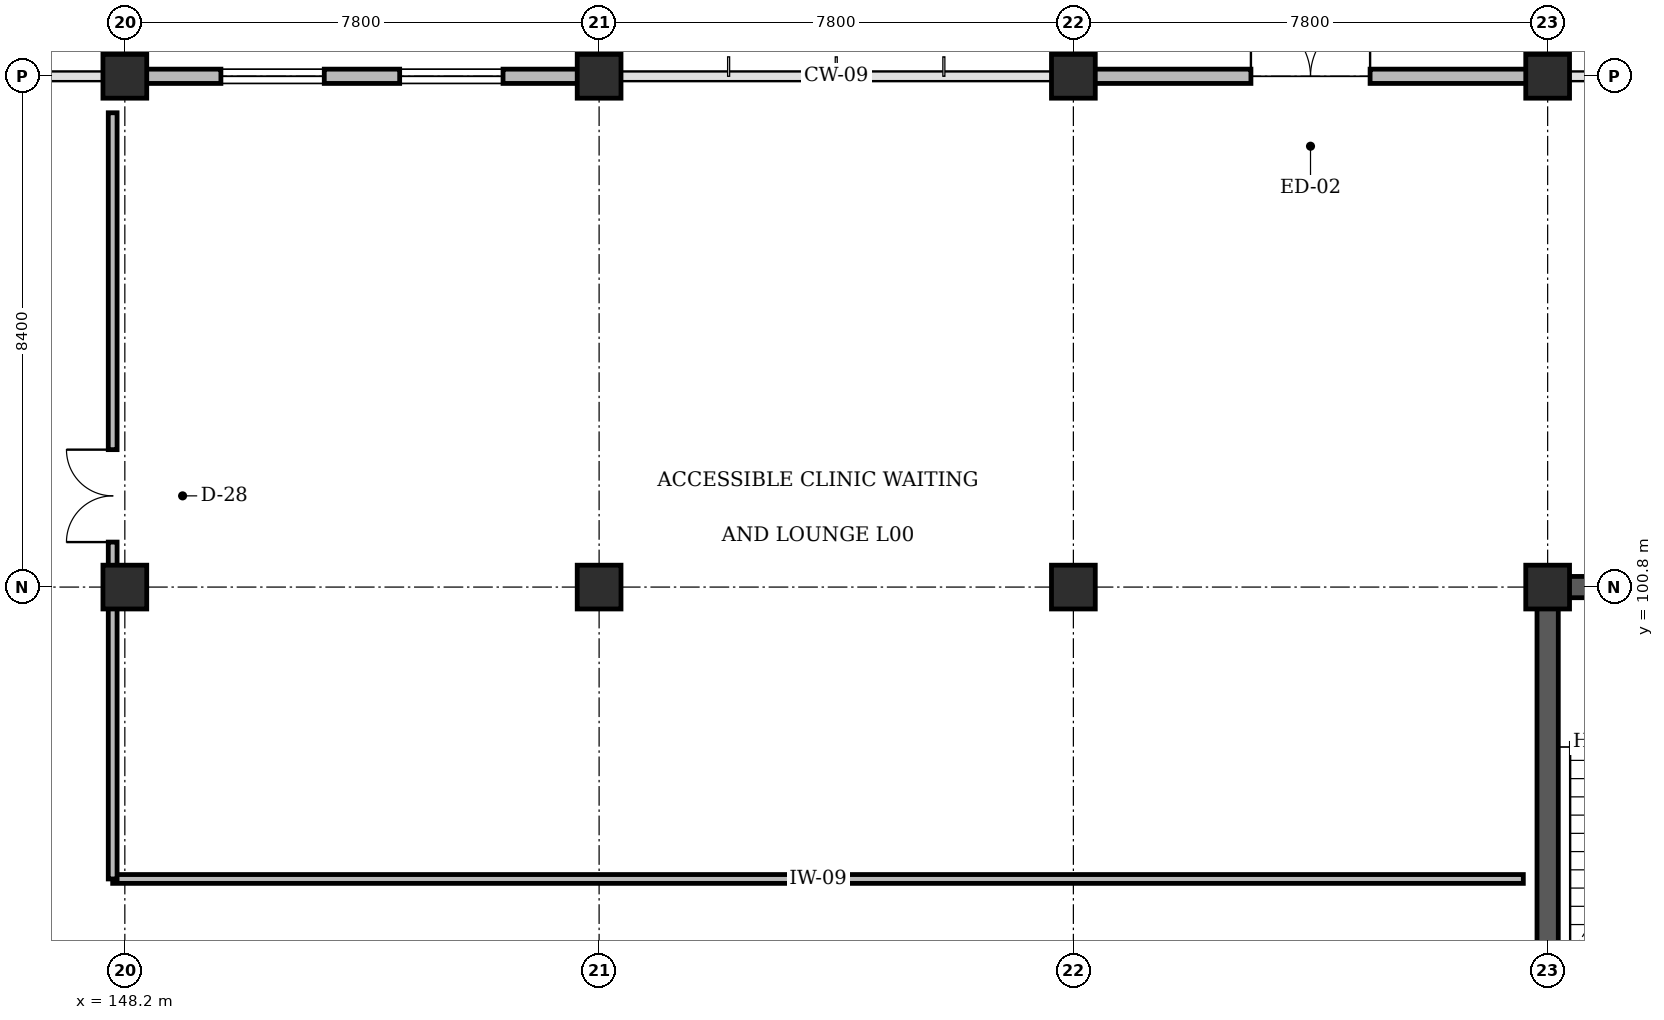
"""IFC4 building model, lengths in metres.
Left out: names, types, materials, properties, quantities, classifications, styles, units other than length and angle.
Written with IfcOpenShell. Run it as: python <this file> out.ifc"""

import sys

from ifc_helpers import new_model, si_unit, direction, frame, frame_2d, origin, origin_2d, place, context, subcontext, project, spatial, rectangle, extrude, element, fill, save


model = new_model("IFC4")
c1 = context("Model", 3, precision=1e-05, world=origin(), true_north=direction((0.0, 1.0)))
c2 = subcontext(c1, "Body", "Model", "MODEL_VIEW")
j1 = project(units=[si_unit("LENGTHUNIT", "METRE"), si_unit("PLANEANGLEUNIT", "RADIAN")], contexts=[c1])
p1 = place(None, origin())
s1 = spatial("IfcSite", under=j1, at=p1, CompositionType="ELEMENT")
p2 = place(p1, origin())
s2 = spatial("IfcBuilding", under=s1, at=p2, CompositionType="ELEMENT")
p3 = place(p2, origin())
s3 = spatial("IfcBuildingStorey", under=s2, at=p3, CompositionType="ELEMENT", Elevation=0.0)
p4 = place(p3, frame((171.425, 100.8, 0.0), z_axis=(0.0, 0.0, 1.0), x_axis=(1.0, 0.0, 0.0)))
e1 = element("IfcWall", 1, at=p4, inside=s3, PredefinedType="SHEAR", context=c2, shape_type="SweptSolid", body=[
    extrude(rectangle(XDim=8.15, YDim=0.35, at=frame_2d((4.075, 0.0))), origin(), (0.0, 0.0, 1.0), 4.48),
])
p5 = place(p3, frame((171.6, 92.4, 0.0), z_axis=(0.0, 0.0, 1.0), x_axis=(0.0, 1.0, 0.0)))
e2 = element("IfcWall", 2, at=p5, inside=s3, PredefinedType="SHEAR", context=c2, shape_type="SweptSolid", body=[
    extrude(rectangle(XDim=8.4, YDim=0.35, at=frame_2d((4.2, 0.0))), origin(), (0.0, 0.0, 1.0), 4.48),
])
for number, where, z_axis, x_axis in (
    (3, (148.2, 100.8, 0.0), (0.0, 0.0, 1.0), (1.0, 0.0, 0.0)),
    (4, (148.2, 109.2, 0.0), (0.0, 0.0, 1.0), (1.0, 0.0, 0.0)),
    (5, (156.0, 100.8, 0.0), (0.0, 0.0, 1.0), (1.0, 0.0, 0.0)),
    (6, (156.0, 109.2, 0.0), (0.0, 0.0, 1.0), (1.0, 0.0, 0.0)),
    (7, (163.8, 100.8, 0.0), (0.0, 0.0, 1.0), (1.0, 0.0, 0.0)),
    (8, (163.8, 109.2, 0.0), (0.0, 0.0, 1.0), (1.0, 0.0, 0.0)),
    (9, (171.6, 100.8, 0.0), (0.0, 0.0, 1.0), (1.0, 0.0, 0.0)),
    (10, (171.6, 109.2, 0.0), (0.0, 0.0, 1.0), (1.0, 0.0, 0.0)),
):
    element("IfcColumn", number, at=place(p3, frame(where, z_axis=z_axis, x_axis=x_axis)), inside=s3, PredefinedType="COLUMN", context=c2, shape_type="SweptSolid", body=[
        extrude(rectangle(XDim=0.72, YDim=0.72, at=origin_2d()), origin(), (0.0, 0.0, 1.0), 4.8),
    ])
p6 = place(p3, frame((148.54, 109.2, 0.0), z_axis=(0.0, 0.0, 1.0), x_axis=(1.0, 0.0, 0.0)))
e11 = element("IfcWall", 11, at=p6, inside=s3, PredefinedType="STANDARD", context=c2, shape_type="SweptSolid", body=[
    extrude(rectangle(XDim=7.12, YDim=0.235, at=frame_2d((3.56, 0.0))), origin(), (0.0, 0.0, 1.0), 3.63),
])
p7 = place(p6, frame((1.24, 0.0, 0.9)))
e12 = element("IfcOpeningElement", 12, at=p7, cuts=e11, PredefinedType="OPENING", context=c2, shape_type="SweptSolid", body=[
    extrude(rectangle(XDim=1.7, YDim=1.6, at=frame_2d((0.85, 0.8))), frame((0.0, 0.127, 0.0), z_axis=(0.0, -1.0, 0.0), x_axis=(1.0, 0.0, 0.0)), (0.0, 0.0, 1.0), 0.255),
])
p8 = place(p6, frame((4.18, 0.0, 0.9)))
e13 = element("IfcOpeningElement", 13, at=p8, cuts=e11, PredefinedType="OPENING", context=c2, shape_type="SweptSolid", body=[
    extrude(rectangle(XDim=1.7, YDim=1.6, at=frame_2d((0.85, 0.8))), frame((0.0, 0.127, 0.0), z_axis=(0.0, -1.0, 0.0), x_axis=(1.0, 0.0, 0.0)), (0.0, 0.0, 1.0), 0.255),
])
p9 = place(p3, frame((164.14, 109.2, 0.0), z_axis=(0.0, 0.0, 1.0), x_axis=(1.0, 0.0, 0.0)))
e14 = element("IfcWall", 14, at=p9, inside=s3, PredefinedType="STANDARD", context=c2, shape_type="SweptSolid", body=[
    extrude(rectangle(XDim=7.12, YDim=0.235, at=frame_2d((3.56, 0.0))), origin(), (0.0, 0.0, 1.0), 3.63),
])
p10 = place(p9, frame((2.58, 0.0, 0.0)))
e15 = element("IfcOpeningElement", 15, at=p10, cuts=e14, PredefinedType="OPENING", context=c2, shape_type="SweptSolid", body=[
    extrude(rectangle(XDim=1.96, YDim=2.2, at=frame_2d((0.98, 1.1))), frame((0.0, 0.127, 0.0), z_axis=(0.0, -1.0, 0.0), x_axis=(1.0, 0.0, 0.0)), (0.0, 0.0, 1.0), 0.255),
])
p11 = place(p3, frame((148.0, 96.0, 0.0), z_axis=(0.0, 0.0, 1.0), x_axis=(1.0, 0.0, 0.0)))
e16 = element("IfcWall", 16, at=p11, inside=s3, PredefinedType="PARTITIONING", context=c2, shape_type="SweptSolid", body=[
    extrude(rectangle(XDim=23.2, YDim=0.145, at=frame_2d((11.6, 0.0))), origin(), (0.0, 0.0, 1.0), 4.46),
])
p12 = place(p3, frame((148.0, 96.0, 0.0), z_axis=(0.0, 0.0, 1.0), x_axis=(0.0, 1.0, 0.0)))
e17 = element("IfcWall", 17, at=p12, inside=s3, PredefinedType="PARTITIONING", context=c2, shape_type="SweptSolid", body=[
    extrude(rectangle(XDim=12.6, YDim=0.145, at=frame_2d((6.3, 0.0))), origin(), (0.0, 0.0, 1.0), 3.615),
])
p13 = place(p12, frame((5.54, 0.0, 0.0)))
e18 = element("IfcOpeningElement", 18, at=p13, cuts=e17, PredefinedType="OPENING", context=c2, shape_type="SweptSolid", body=[
    extrude(rectangle(XDim=1.52, YDim=2.2, at=frame_2d((0.76, 1.1))), frame((0.0, 0.083, 0.0), z_axis=(0.0, -1.0, 0.0), x_axis=(1.0, 0.0, 0.0)), (0.0, 0.0, 1.0), 0.165),
])
p14 = place(p7, origin())
e19 = element("IfcWindow", 19, at=p14, inside=s3, PartitioningType="SINGLE_PANEL", PredefinedType="WINDOW", context=c2, shape_type="SweptSolid", body=[
    extrude(rectangle(XDim=1.7, YDim=1.6, at=frame_2d((0.85, 0.8))), frame((0.0, 0.03, 0.0), z_axis=(0.0, -1.0, 0.0), x_axis=(1.0, 0.0, 0.0)), (0.0, 0.0, 1.0), 0.06),
])
fill(e12, e19)
p15 = place(p8, origin())
e20 = element("IfcWindow", 20, at=p15, inside=s3, PartitioningType="SINGLE_PANEL", PredefinedType="WINDOW", context=c2, shape_type="SweptSolid", body=[
    extrude(rectangle(XDim=1.7, YDim=1.6, at=frame_2d((0.85, 0.8))), frame((0.0, 0.03, 0.0), z_axis=(0.0, -1.0, 0.0), x_axis=(1.0, 0.0, 0.0)), (0.0, 0.0, 1.0), 0.06),
])
fill(e13, e20)
p16 = place(p10, origin())
e21 = element("IfcDoor", 21, at=p16, inside=s3, OperationType="DOUBLE_DOOR_SINGLE_SWING", PredefinedType="DOOR", context=c2, shape_type="SweptSolid", body=[
    extrude(rectangle(XDim=1.96, YDim=2.2, at=frame_2d((0.98, 1.1))), frame((0.0, 0.025, 0.0), z_axis=(0.0, -1.0, 0.0), x_axis=(1.0, 0.0, 0.0)), (0.0, 0.0, 1.0), 0.05),
])
fill(e15, e21)
p17 = place(p13, origin())
e22 = element("IfcDoor", 22, at=p17, inside=s3, OperationType="DOUBLE_DOOR_SINGLE_SWING", PredefinedType="DOOR", context=c2, shape_type="SweptSolid", body=[
    extrude(rectangle(XDim=1.52, YDim=2.2, at=frame_2d((0.76, 1.1))), frame((0.0, 0.025, 0.0), z_axis=(0.0, -1.0, 0.0), x_axis=(1.0, 0.0, 0.0)), (0.0, 0.0, 1.0), 0.05),
])
fill(e18, e22)
save(model, sys.argv[1])
